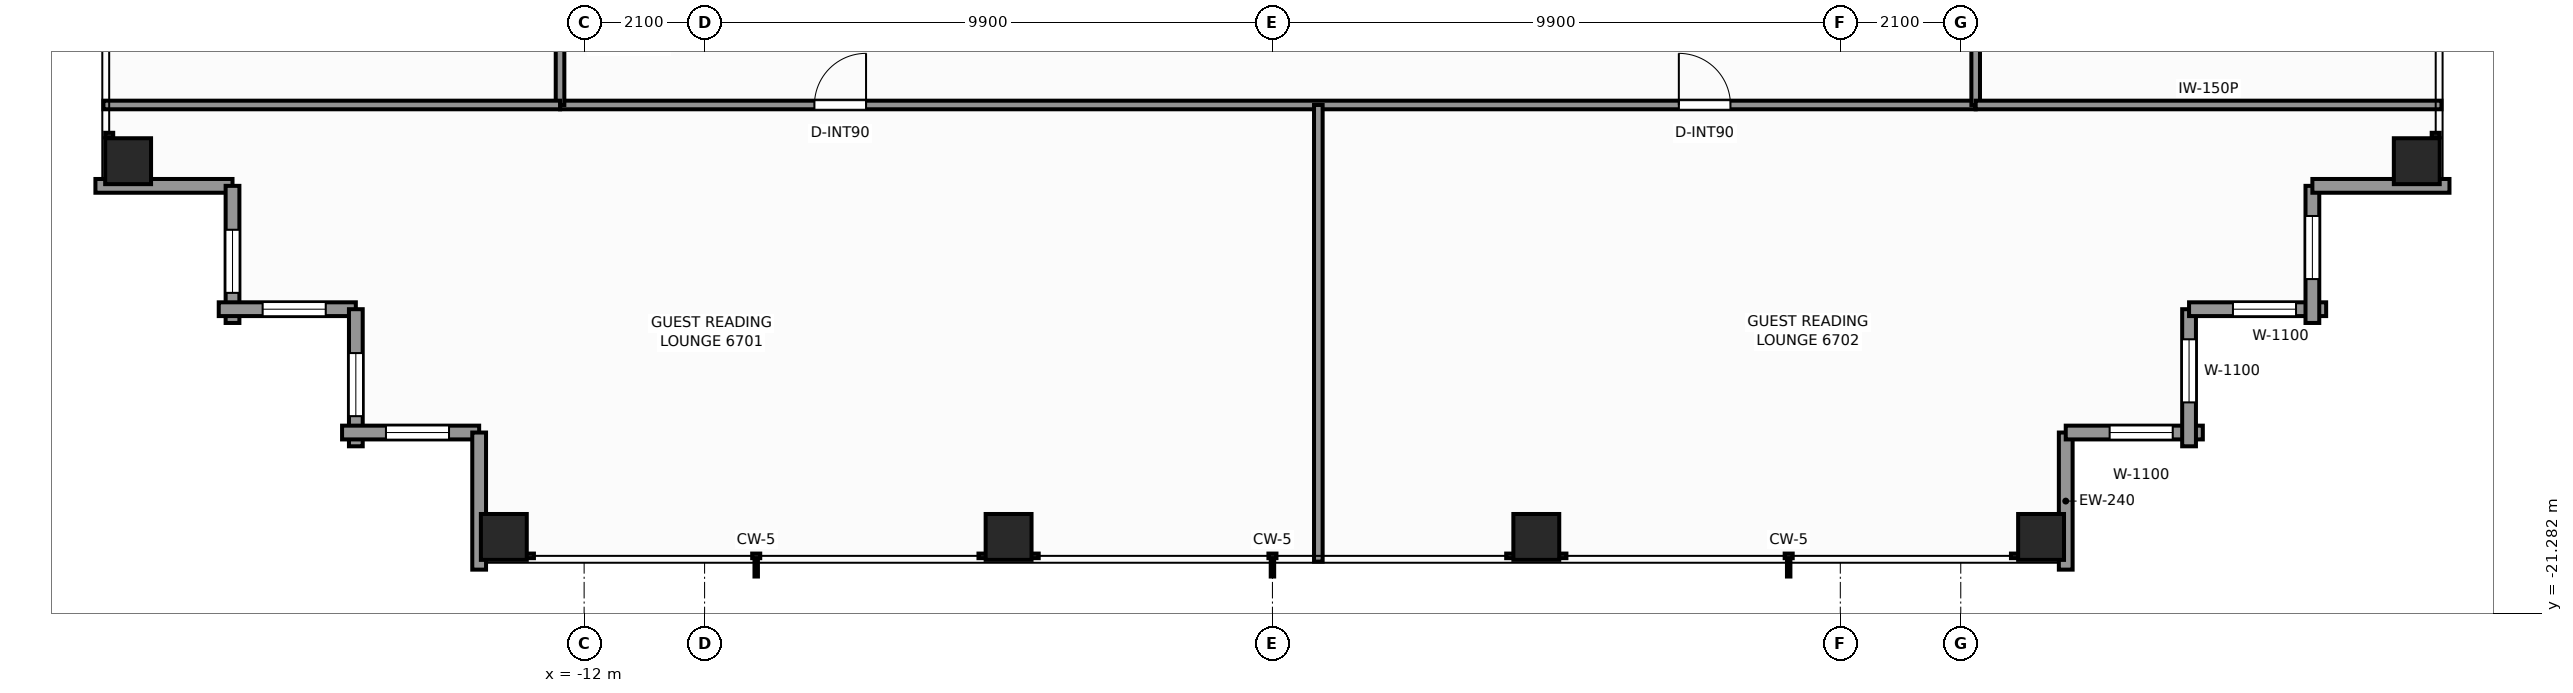
"""IFC4 building model, lengths in metres.
Left out: names, types, materials, properties, quantities, classifications, styles, units other than length and angle.
Written with IfcOpenShell. Run it as: python <this file> out.ifc"""

import sys

from ifc_helpers import new_model, si_unit, direction, frame, frame_2d, origin, origin_2d, place, context, subcontext, project, spatial, rectangle, extrude, element, fill, save


model = new_model("IFC4")
c1 = context("Model", 3, precision=1e-05, world=origin(), true_north=direction((0.0, 1.0)))
c2 = subcontext(c1, "Body", "Model", "MODEL_VIEW")
j1 = project(units=[si_unit("LENGTHUNIT", "METRE"), si_unit("PLANEANGLEUNIT", "RADIAN")], contexts=[c1])
p1 = place(None, origin())
s1 = spatial("IfcSite", under=j1, at=p1, CompositionType="ELEMENT")
p2 = place(p1, origin())
s2 = spatial("IfcBuilding", under=s1, at=p2, CompositionType="ELEMENT")
p3 = place(p2, frame((0.0, 0.0, 229.5)))
s3 = spatial("IfcBuildingStorey", under=s2, at=p3, CompositionType="ELEMENT", Elevation=229.5)
for number, where, z_axis, x_axis in (
    (1, (-13.4, -19.95, 0.0), (0.0, 0.0, 1.0), (1.0, 0.0, 0.0)),
    (2, (-4.6, -19.95, 0.0), (0.0, 0.0, 1.0), (1.0, 0.0, 0.0)),
    (3, (4.6, -19.95, 0.0), (0.0, 0.0, 1.0), (1.0, 0.0, 0.0)),
    (4, (13.4, -19.95, 0.0), (0.0, 0.0, 1.0), (1.0, 0.0, 0.0)),
    (5, (-19.95, -13.4, 0.0), (0.0, 0.0, 1.0), (1.0, 0.0, 0.0)),
    (6, (19.95, -13.4, 0.0), (0.0, 0.0, 1.0), (1.0, 0.0, 0.0)),
):
    element("IfcColumn", number, at=place(p3, frame(where, z_axis=z_axis, x_axis=x_axis)), inside=s3, PredefinedType="COLUMN", context=c2, shape_type="SweptSolid", body=[
        extrude(rectangle(XDim=0.8, YDim=0.8, at=origin_2d()), origin(), (0.0, 0.0, 1.0), 3.3),
    ])
p4 = place(p3, frame((13.83, -18.13, 0.0), z_axis=(0.0, 0.0, 1.0), x_axis=(0.0, -1.0, 0.0)))
e7 = element("IfcWall", 7, at=p4, inside=s3, PredefinedType="STANDARD", context=c2, shape_type="SweptSolid", body=[
    extrude(rectangle(XDim=2.39, YDim=0.24, at=frame_2d((1.195, 0.0))), origin(), (0.0, 0.0, 1.0), 2.333),
])
p5 = place(p3, frame((16.22, -18.13, 0.0), z_axis=(0.0, 0.0, 1.0), x_axis=(-1.0, 0.0, 0.0)))
e8 = element("IfcWall", 8, at=p5, inside=s3, PredefinedType="STANDARD", context=c2, shape_type="SweptSolid", body=[
    extrude(rectangle(XDim=2.39, YDim=0.24, at=frame_2d((1.195, 0.0))), origin(), (0.0, 0.0, 1.0), 2.333),
])
p6 = place(p5, frame((0.525, 0.0, 0.65)))
e9 = element("IfcOpeningElement", 9, at=p6, cuts=e8, PredefinedType="OPENING", context=c2, shape_type="SweptSolid", body=[
    extrude(rectangle(XDim=1.1, YDim=1.45, at=frame_2d((0.55, 0.725))), frame((0.0, 0.13, 0.0), z_axis=(0.0, -1.0, 0.0), x_axis=(1.0, 0.0, 0.0)), (0.0, 0.0, 1.0), 0.26),
])
p7 = place(p3, frame((15.98, -15.98, 0.0), z_axis=(0.0, 0.0, 1.0), x_axis=(0.0, -1.0, 0.0)))
e10 = element("IfcWall", 10, at=p7, inside=s3, PredefinedType="STANDARD", context=c2, shape_type="SweptSolid", body=[
    extrude(rectangle(XDim=2.39, YDim=0.24, at=frame_2d((1.195, 0.0))), origin(), (0.0, 0.0, 1.0), 2.333),
])
p8 = place(p7, frame((0.525, 0.0, 0.65)))
e11 = element("IfcOpeningElement", 11, at=p8, cuts=e10, PredefinedType="OPENING", context=c2, shape_type="SweptSolid", body=[
    extrude(rectangle(XDim=1.1, YDim=1.45, at=frame_2d((0.55, 0.725))), frame((0.0, 0.13, 0.0), z_axis=(0.0, -1.0, 0.0), x_axis=(1.0, 0.0, 0.0)), (0.0, 0.0, 1.0), 0.26),
])
p9 = place(p3, frame((18.37, -15.98, 0.0), z_axis=(0.0, 0.0, 1.0), x_axis=(-1.0, 0.0, 0.0)))
e12 = element("IfcWall", 12, at=p9, inside=s3, PredefinedType="STANDARD", context=c2, shape_type="SweptSolid", body=[
    extrude(rectangle(XDim=2.39, YDim=0.24, at=frame_2d((1.195, 0.0))), origin(), (0.0, 0.0, 1.0), 2.333),
])
p10 = place(p9, frame((0.525, 0.0, 0.65)))
e13 = element("IfcOpeningElement", 13, at=p10, cuts=e12, PredefinedType="OPENING", context=c2, shape_type="SweptSolid", body=[
    extrude(rectangle(XDim=1.1, YDim=1.45, at=frame_2d((0.55, 0.725))), frame((0.0, 0.13, 0.0), z_axis=(0.0, -1.0, 0.0), x_axis=(1.0, 0.0, 0.0)), (0.0, 0.0, 1.0), 0.26),
])
p11 = place(p3, frame((18.13, -13.83, 0.0), z_axis=(0.0, 0.0, 1.0), x_axis=(0.0, -1.0, 0.0)))
e14 = element("IfcWall", 14, at=p11, inside=s3, PredefinedType="STANDARD", context=c2, shape_type="SweptSolid", body=[
    extrude(rectangle(XDim=2.39, YDim=0.24, at=frame_2d((1.195, 0.0))), origin(), (0.0, 0.0, 1.0), 2.333),
])
p12 = place(p11, frame((0.525, 0.0, 0.65)))
e15 = element("IfcOpeningElement", 15, at=p12, cuts=e14, PredefinedType="OPENING", context=c2, shape_type="SweptSolid", body=[
    extrude(rectangle(XDim=1.1, YDim=1.45, at=frame_2d((0.55, 0.725))), frame((0.0, 0.13, 0.0), z_axis=(0.0, -1.0, 0.0), x_axis=(1.0, 0.0, 0.0)), (0.0, 0.0, 1.0), 0.26),
])
for number, where, z_axis, x_axis in (
    (16, (20.52, -13.83, 0.0), (0.0, 0.0, 1.0), (-1.0, 0.0, 0.0)),
    (17, (-18.13, -13.83, 0.0), (0.0, 0.0, 1.0), (-1.0, 0.0, 0.0)),
):
    element("IfcWall", number, at=place(p3, frame(where, z_axis=z_axis, x_axis=x_axis)), inside=s3, PredefinedType="STANDARD", context=c2, shape_type="SweptSolid", body=[
        extrude(rectangle(XDim=2.39, YDim=0.24, at=frame_2d((1.195, 0.0))), origin(), (0.0, 0.0, 1.0), 2.333),
    ])
p13 = place(p3, frame((-18.13, -16.22, 0.0), z_axis=(0.0, 0.0, 1.0), x_axis=(0.0, 1.0, 0.0)))
e18 = element("IfcWall", 18, at=p13, inside=s3, PredefinedType="STANDARD", context=c2, shape_type="SweptSolid", body=[
    extrude(rectangle(XDim=2.39, YDim=0.24, at=frame_2d((1.195, 0.0))), origin(), (0.0, 0.0, 1.0), 2.333),
])
p14 = place(p13, frame((0.525, 0.0, 0.65)))
e19 = element("IfcOpeningElement", 19, at=p14, cuts=e18, PredefinedType="OPENING", context=c2, shape_type="SweptSolid", body=[
    extrude(rectangle(XDim=1.1, YDim=1.45, at=frame_2d((0.55, 0.725))), frame((0.0, 0.13, 0.0), z_axis=(0.0, -1.0, 0.0), x_axis=(1.0, 0.0, 0.0)), (0.0, 0.0, 1.0), 0.26),
])
p15 = place(p3, frame((-15.98, -15.98, 0.0), z_axis=(0.0, 0.0, 1.0), x_axis=(-1.0, 0.0, 0.0)))
e20 = element("IfcWall", 20, at=p15, inside=s3, PredefinedType="STANDARD", context=c2, shape_type="SweptSolid", body=[
    extrude(rectangle(XDim=2.39, YDim=0.24, at=frame_2d((1.195, 0.0))), origin(), (0.0, 0.0, 1.0), 2.333),
])
p16 = place(p15, frame((0.525, 0.0, 0.65)))
e21 = element("IfcOpeningElement", 21, at=p16, cuts=e20, PredefinedType="OPENING", context=c2, shape_type="SweptSolid", body=[
    extrude(rectangle(XDim=1.1, YDim=1.45, at=frame_2d((0.55, 0.725))), frame((0.0, 0.13, 0.0), z_axis=(0.0, -1.0, 0.0), x_axis=(1.0, 0.0, 0.0)), (0.0, 0.0, 1.0), 0.26),
])
p17 = place(p3, frame((-15.98, -18.37, 0.0), z_axis=(0.0, 0.0, 1.0), x_axis=(0.0, 1.0, 0.0)))
e22 = element("IfcWall", 22, at=p17, inside=s3, PredefinedType="STANDARD", context=c2, shape_type="SweptSolid", body=[
    extrude(rectangle(XDim=2.39, YDim=0.24, at=frame_2d((1.195, 0.0))), origin(), (0.0, 0.0, 1.0), 2.333),
])
p18 = place(p17, frame((0.525, 0.0, 0.65)))
e23 = element("IfcOpeningElement", 23, at=p18, cuts=e22, PredefinedType="OPENING", context=c2, shape_type="SweptSolid", body=[
    extrude(rectangle(XDim=1.1, YDim=1.45, at=frame_2d((0.55, 0.725))), frame((0.0, 0.13, 0.0), z_axis=(0.0, -1.0, 0.0), x_axis=(1.0, 0.0, 0.0)), (0.0, 0.0, 1.0), 0.26),
])
p19 = place(p3, frame((-13.83, -18.13, 0.0), z_axis=(0.0, 0.0, 1.0), x_axis=(-1.0, 0.0, 0.0)))
e24 = element("IfcWall", 24, at=p19, inside=s3, PredefinedType="STANDARD", context=c2, shape_type="SweptSolid", body=[
    extrude(rectangle(XDim=2.39, YDim=0.24, at=frame_2d((1.195, 0.0))), origin(), (0.0, 0.0, 1.0), 2.333),
])
p20 = place(p19, frame((0.525, 0.0, 0.65)))
e25 = element("IfcOpeningElement", 25, at=p20, cuts=e24, PredefinedType="OPENING", context=c2, shape_type="SweptSolid", body=[
    extrude(rectangle(XDim=1.1, YDim=1.45, at=frame_2d((0.55, 0.725))), frame((0.0, 0.13, 0.0), z_axis=(0.0, -1.0, 0.0), x_axis=(1.0, 0.0, 0.0)), (0.0, 0.0, 1.0), 0.26),
])
p21 = place(p3, frame((-13.83, -20.52, 0.0), z_axis=(0.0, 0.0, 1.0), x_axis=(0.0, 1.0, 0.0)))
e26 = element("IfcWall", 26, at=p21, inside=s3, PredefinedType="STANDARD", context=c2, shape_type="SweptSolid", body=[
    extrude(rectangle(XDim=2.39, YDim=0.24, at=frame_2d((1.195, 0.0))), origin(), (0.0, 0.0, 1.0), 2.333),
])
p22 = place(p3, frame((-12.42, -12.42, 0.0), z_axis=(0.0, 0.0, 1.0), x_axis=(1.0, 0.0, 0.0)))
e27 = element("IfcWall", 27, at=p22, inside=s3, PredefinedType="PARTITIONING", context=c2, shape_type="SweptSolid", body=[
    extrude(rectangle(XDim=24.68, YDim=0.15, at=frame_2d((12.34, 0.0))), origin(), (0.0, 0.0, 1.0), 2.239),
])
p23 = place(p22, frame((4.435, 0.0, 0.0)))
e28 = element("IfcOpeningElement", 28, at=p23, cuts=e27, PredefinedType="OPENING", context=c2, shape_type="SweptSolid", body=[
    extrude(rectangle(XDim=0.9, YDim=2.06, at=frame_2d((0.45, 1.03))), frame((0.0, 0.085, 0.0), z_axis=(0.0, -1.0, 0.0), x_axis=(1.0, 0.0, 0.0)), (0.0, 0.0, 1.0), 0.17),
])
p24 = place(p22, frame((19.505, 0.0, 0.0)))
e29 = element("IfcOpeningElement", 29, at=p24, cuts=e27, PredefinedType="OPENING", context=c2, shape_type="SweptSolid", body=[
    extrude(rectangle(XDim=0.9, YDim=2.06, at=frame_2d((0.45, 1.03))), frame((0.0, 0.085, 0.0), z_axis=(0.0, -1.0, 0.0), x_axis=(1.0, 0.0, 0.0)), (0.0, 0.0, 1.0), 0.17),
])
p25 = place(p3, frame((-12.42, -12.42, 0.0), z_axis=(0.0, 0.0, 1.0), x_axis=(0.0, 1.0, 0.0)))
e30 = element("IfcWall", 30, at=p25, inside=s3, PredefinedType="PARTITIONING", context=c2, shape_type="SweptSolid", body=[
    extrude(rectangle(XDim=24.84, YDim=0.15, at=frame_2d((12.42, 0.0))), origin(), (0.0, 0.0, 1.0), 2.239),
])
p26 = place(p25, frame((3.137, 0.0, 0.0)))
e31 = element("IfcOpeningElement", 31, at=p26, cuts=e30, PredefinedType="OPENING", context=c2, shape_type="SweptSolid", body=[
    extrude(rectangle(XDim=0.95, YDim=2.06, at=frame_2d((0.475, 1.03))), frame((0.0, 0.085, 0.0), z_axis=(0.0, -1.0, 0.0), x_axis=(1.0, 0.0, 0.0)), (0.0, 0.0, 1.0), 0.17),
])
p27 = place(p25, frame((14.131, 0.0, 0.0)))
e32 = element("IfcOpeningElement", 32, at=p27, cuts=e30, PredefinedType="OPENING", context=c2, shape_type="SweptSolid", body=[
    extrude(rectangle(XDim=0.95, YDim=2.06, at=frame_2d((0.475, 1.03))), frame((0.0, 0.085, 0.0), z_axis=(0.0, -1.0, 0.0), x_axis=(1.0, 0.0, 0.0)), (0.0, 0.0, 1.0), 0.17),
])
p28 = place(p25, frame((20.952, 0.0, 0.0)))
e33 = element("IfcOpeningElement", 33, at=p28, cuts=e30, PredefinedType="OPENING", context=c2, shape_type="SweptSolid", body=[
    extrude(rectangle(XDim=0.95, YDim=2.06, at=frame_2d((0.475, 1.03))), frame((0.0, 0.085, 0.0), z_axis=(0.0, -1.0, 0.0), x_axis=(1.0, 0.0, 0.0)), (0.0, 0.0, 1.0), 0.17),
])
p29 = place(p3, frame((12.26, -12.42, 0.0), z_axis=(0.0, 0.0, 1.0), x_axis=(0.0, 1.0, 0.0)))
e34 = element("IfcWall", 34, at=p29, inside=s3, PredefinedType="PARTITIONING", context=c2, shape_type="SweptSolid", body=[
    extrude(rectangle(XDim=24.84, YDim=0.15, at=frame_2d((12.42, 0.0))), origin(), (0.0, 0.0, 1.0), 2.239),
])
p30 = place(p29, frame((3.024, 0.0, 0.0)))
e35 = element("IfcOpeningElement", 35, at=p30, cuts=e34, PredefinedType="OPENING", context=c2, shape_type="SweptSolid", body=[
    extrude(rectangle(XDim=0.9, YDim=2.06, at=frame_2d((0.45, 1.03))), frame((0.0, 0.085, 0.0), z_axis=(0.0, -1.0, 0.0), x_axis=(1.0, 0.0, 0.0)), (0.0, 0.0, 1.0), 0.17),
])
p31 = place(p29, frame((5.359, 0.0, 0.0)))
e36 = element("IfcOpeningElement", 36, at=p31, cuts=e34, PredefinedType="OPENING", context=c2, shape_type="SweptSolid", body=[
    extrude(rectangle(XDim=0.9, YDim=2.06, at=frame_2d((0.45, 1.03))), frame((0.0, 0.085, 0.0), z_axis=(0.0, -1.0, 0.0), x_axis=(1.0, 0.0, 0.0)), (0.0, 0.0, 1.0), 0.17),
])
p32 = place(p29, frame((14.0, 0.0, 0.0)))
e37 = element("IfcOpeningElement", 37, at=p32, cuts=e34, PredefinedType="OPENING", context=c2, shape_type="SweptSolid", body=[
    extrude(rectangle(XDim=0.9, YDim=2.06, at=frame_2d((0.45, 1.03))), frame((0.0, 0.085, 0.0), z_axis=(0.0, -1.0, 0.0), x_axis=(1.0, 0.0, 0.0)), (0.0, 0.0, 1.0), 0.17),
])
p33 = place(p29, frame((19.881, 0.0, 0.0)))
e38 = element("IfcOpeningElement", 38, at=p33, cuts=e34, PredefinedType="OPENING", context=c2, shape_type="SweptSolid", body=[
    extrude(rectangle(XDim=0.9, YDim=2.06, at=frame_2d((0.45, 1.03))), frame((0.0, 0.085, 0.0), z_axis=(0.0, -1.0, 0.0), x_axis=(1.0, 0.0, 0.0)), (0.0, 0.0, 1.0), 0.17),
])
p34 = place(p3, frame((-20.38, -12.42, 0.0), z_axis=(0.0, 0.0, 1.0), x_axis=(1.0, 0.0, 0.0)))
e39 = element("IfcWall", 39, at=p34, inside=s3, PredefinedType="PARTITIONING", context=c2, shape_type="SweptSolid", body=[
    extrude(rectangle(XDim=7.96, YDim=0.15, at=frame_2d((3.98, 0.0))), origin(), (0.0, 0.0, 1.0), 2.239),
])
p35 = place(p3, frame((12.26, -12.42, 0.0), z_axis=(0.0, 0.0, 1.0), x_axis=(1.0, 0.0, 0.0)))
e40 = element("IfcWall", 40, at=p35, inside=s3, PredefinedType="PARTITIONING", context=c2, shape_type="SweptSolid", body=[
    extrude(rectangle(XDim=8.12, YDim=0.15, at=frame_2d((4.06, 0.0))), origin(), (0.0, 0.0, 1.0), 2.239),
])
p36 = place(p3, frame((0.8, -20.38, 0.0), z_axis=(0.0, 0.0, 1.0), x_axis=(0.0, 1.0, 0.0)))
e41 = element("IfcWall", 41, at=p36, inside=s3, PredefinedType="PARTITIONING", context=c2, shape_type="SweptSolid", body=[
    extrude(rectangle(XDim=7.96, YDim=0.15, at=frame_2d((3.98, 0.0))), origin(), (0.0, 0.0, 1.0), 2.323),
])
p37 = place(p6, origin())
e42 = element("IfcWindow", 42, at=p37, inside=s3, PartitioningType="SINGLE_PANEL", PredefinedType="WINDOW", context=c2, shape_type="SweptSolid", body=[
    extrude(rectangle(XDim=1.1, YDim=1.45, at=frame_2d((0.55, 0.725))), frame((0.0, 0.03, 0.0), z_axis=(0.0, -1.0, 0.0), x_axis=(1.0, 0.0, 0.0)), (0.0, 0.0, 1.0), 0.06),
])
fill(e9, e42)
p38 = place(p8, origin())
e43 = element("IfcWindow", 43, at=p38, inside=s3, PartitioningType="SINGLE_PANEL", PredefinedType="WINDOW", context=c2, shape_type="SweptSolid", body=[
    extrude(rectangle(XDim=1.1, YDim=1.45, at=frame_2d((0.55, 0.725))), frame((0.0, 0.03, 0.0), z_axis=(0.0, -1.0, 0.0), x_axis=(1.0, 0.0, 0.0)), (0.0, 0.0, 1.0), 0.06),
])
fill(e11, e43)
p39 = place(p10, origin())
e44 = element("IfcWindow", 44, at=p39, inside=s3, PartitioningType="SINGLE_PANEL", PredefinedType="WINDOW", context=c2, shape_type="SweptSolid", body=[
    extrude(rectangle(XDim=1.1, YDim=1.45, at=frame_2d((0.55, 0.725))), frame((0.0, 0.03, 0.0), z_axis=(0.0, -1.0, 0.0), x_axis=(1.0, 0.0, 0.0)), (0.0, 0.0, 1.0), 0.06),
])
fill(e13, e44)
p40 = place(p12, origin())
e45 = element("IfcWindow", 45, at=p40, inside=s3, PartitioningType="SINGLE_PANEL", PredefinedType="WINDOW", context=c2, shape_type="SweptSolid", body=[
    extrude(rectangle(XDim=1.1, YDim=1.45, at=frame_2d((0.55, 0.725))), frame((0.0, 0.03, 0.0), z_axis=(0.0, -1.0, 0.0), x_axis=(1.0, 0.0, 0.0)), (0.0, 0.0, 1.0), 0.06),
])
fill(e15, e45)
p41 = place(p14, origin())
e46 = element("IfcWindow", 46, at=p41, inside=s3, PartitioningType="SINGLE_PANEL", PredefinedType="WINDOW", context=c2, shape_type="SweptSolid", body=[
    extrude(rectangle(XDim=1.1, YDim=1.45, at=frame_2d((0.55, 0.725))), frame((0.0, 0.03, 0.0), z_axis=(0.0, -1.0, 0.0), x_axis=(1.0, 0.0, 0.0)), (0.0, 0.0, 1.0), 0.06),
])
fill(e19, e46)
p42 = place(p16, origin())
e47 = element("IfcWindow", 47, at=p42, inside=s3, PartitioningType="SINGLE_PANEL", PredefinedType="WINDOW", context=c2, shape_type="SweptSolid", body=[
    extrude(rectangle(XDim=1.1, YDim=1.45, at=frame_2d((0.55, 0.725))), frame((0.0, 0.03, 0.0), z_axis=(0.0, -1.0, 0.0), x_axis=(1.0, 0.0, 0.0)), (0.0, 0.0, 1.0), 0.06),
])
fill(e21, e47)
p43 = place(p18, origin())
e48 = element("IfcWindow", 48, at=p43, inside=s3, PartitioningType="SINGLE_PANEL", PredefinedType="WINDOW", context=c2, shape_type="SweptSolid", body=[
    extrude(rectangle(XDim=1.1, YDim=1.45, at=frame_2d((0.55, 0.725))), frame((0.0, 0.03, 0.0), z_axis=(0.0, -1.0, 0.0), x_axis=(1.0, 0.0, 0.0)), (0.0, 0.0, 1.0), 0.06),
])
fill(e23, e48)
p44 = place(p20, origin())
e49 = element("IfcWindow", 49, at=p44, inside=s3, PartitioningType="SINGLE_PANEL", PredefinedType="WINDOW", context=c2, shape_type="SweptSolid", body=[
    extrude(rectangle(XDim=1.1, YDim=1.45, at=frame_2d((0.55, 0.725))), frame((0.0, 0.03, 0.0), z_axis=(0.0, -1.0, 0.0), x_axis=(1.0, 0.0, 0.0)), (0.0, 0.0, 1.0), 0.06),
])
fill(e25, e49)
p45 = place(p23, origin())
e50 = element("IfcDoor", 50, at=p45, inside=s3, OperationType="SINGLE_SWING_RIGHT", PredefinedType="DOOR", context=c2, shape_type="SweptSolid", body=[
    extrude(rectangle(XDim=0.9, YDim=2.06, at=frame_2d((0.45, 1.03))), frame((0.0, 0.025, 0.0), z_axis=(0.0, -1.0, 0.0), x_axis=(1.0, 0.0, 0.0)), (0.0, 0.0, 1.0), 0.05),
])
fill(e28, e50)
p46 = place(p24, origin())
e51 = element("IfcDoor", 51, at=p46, inside=s3, OperationType="SINGLE_SWING_LEFT", PredefinedType="DOOR", context=c2, shape_type="SweptSolid", body=[
    extrude(rectangle(XDim=0.9, YDim=2.06, at=frame_2d((0.45, 1.03))), frame((0.0, 0.025, 0.0), z_axis=(0.0, -1.0, 0.0), x_axis=(1.0, 0.0, 0.0)), (0.0, 0.0, 1.0), 0.05),
])
fill(e29, e51)
save(model, sys.argv[1])
